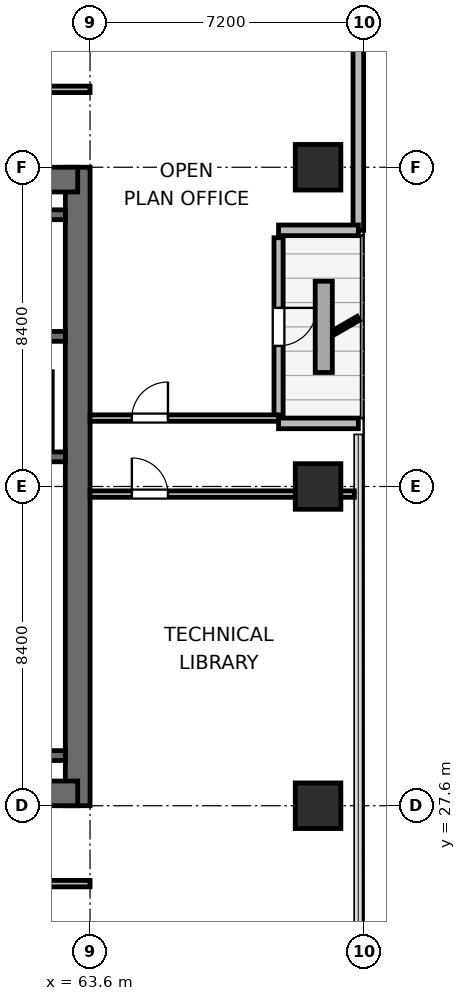
"""IFC4 building model, lengths in metres.
Left out: names, types, materials, properties, quantities, classifications, styles, units other than length and angle.
Written with IfcOpenShell. Run it as: python <this file> out.ifc"""

import sys

from ifc_helpers import new_model, si_unit, direction, frame, frame_2d, origin, origin_2d, place, context, subcontext, project, spatial, rectangle, extrude, element, fill, save


model = new_model("IFC4")
c1 = context("Model", 3, precision=1e-05, world=origin(), true_north=direction((0.0, 1.0)))
c2 = subcontext(c1, "Body", "Model", "MODEL_VIEW")
j1 = project(units=[si_unit("LENGTHUNIT", "METRE"), si_unit("PLANEANGLEUNIT", "RADIAN")], contexts=[c1])
p1 = place(None, origin())
s1 = spatial("IfcSite", under=j1, at=p1, CompositionType="ELEMENT")
p2 = place(p1, origin())
s2 = spatial("IfcBuilding", under=s1, at=p2, CompositionType="ELEMENT")
p3 = place(p2, frame((0.0, 0.0, 181.8)))
s3 = spatial("IfcBuildingStorey", under=s2, at=p3, CompositionType="ELEMENT", Elevation=181.8)
p4 = place(p3, frame((63.275, 27.6, 0.0), z_axis=(0.0, 0.0, 1.0), x_axis=(0.0, 1.0, 0.0)))
e1 = element("IfcWall", 1, at=p4, inside=s3, PredefinedType="SHEAR", context=c2, shape_type="SweptSolid", body=[
    extrude(rectangle(XDim=16.8, YDim=0.65, at=frame_2d((8.4, 0.0))), origin(), (0.0, 0.0, 1.0), 4.5),
])
p5 = place(p3, frame((53.925, 27.925, 0.0), z_axis=(0.0, 0.0, 1.0), x_axis=(1.0, 0.0, 0.0)))
e2 = element("IfcWall", 2, at=p5, inside=s3, PredefinedType="SHEAR", context=c2, shape_type="SweptSolid", body=[
    extrude(rectangle(XDim=9.35, YDim=0.65, at=frame_2d((4.675, 0.0))), origin(), (0.0, 0.0, 1.0), 4.5),
])
p6 = place(p5, frame((3.975, 0.0, 0.0)))
e3 = element("IfcOpeningElement", 3, at=p6, cuts=e2, PredefinedType="OPENING", context=c2, shape_type="SweptSolid", body=[
    extrude(rectangle(XDim=1.05, YDim=2.04, at=frame_2d((0.525, 1.02))), frame((0.0, 0.335, 0.0), z_axis=(0.0, -1.0, 0.0), x_axis=(1.0, 0.0, 0.0)), (0.0, 0.0, 1.0), 0.67),
])
p7 = place(p3, frame((53.925, 44.075, 0.0), z_axis=(0.0, 0.0, 1.0), x_axis=(1.0, 0.0, 0.0)))
e4 = element("IfcWall", 4, at=p7, inside=s3, PredefinedType="SHEAR", context=c2, shape_type="SweptSolid", body=[
    extrude(rectangle(XDim=9.35, YDim=0.65, at=frame_2d((4.675, 0.0))), origin(), (0.0, 0.0, 1.0), 4.5),
])
for number, where, z_axis, x_axis in (
    (5, (58.89, 28.92, 0.0), (0.0, 0.0, 1.0), (1.0, 0.0, 0.0)),
    (6, (58.89, 36.78, 0.0), (0.0, 0.0, 1.0), (1.0, 0.0, 0.0)),
):
    element("IfcWall", number, at=place(p3, frame(where, z_axis=z_axis, x_axis=x_axis)), inside=s3, PredefinedType="SHEAR", context=c2, shape_type="SweptSolid", body=[
        extrude(rectangle(XDim=4.06, YDim=0.26, at=frame_2d((2.03, 0.0))), origin(), (0.0, 0.0, 1.0), 4.5),
    ])
p8 = place(p3, frame((54.25, 39.95, 0.0), z_axis=(0.0, 0.0, 1.0), x_axis=(1.0, 0.0, 0.0)))
e7 = element("IfcWall", 7, at=p8, inside=s3, PredefinedType="SHEAR", context=c2, shape_type="SweptSolid", body=[
    extrude(rectangle(XDim=8.7, YDim=0.26, at=frame_2d((4.35, 0.0))), origin(), (0.0, 0.0, 1.0), 4.5),
])
p9 = place(p8, frame((0.95, 0.0, 0.0)))
e8 = element("IfcOpeningElement", 8, at=p9, cuts=e7, PredefinedType="OPENING", context=c2, shape_type="SweptSolid", body=[
    extrude(rectangle(XDim=1.0, YDim=2.04, at=frame_2d((0.5, 1.02))), frame((0.0, 0.14, 0.0), z_axis=(0.0, -1.0, 0.0), x_axis=(1.0, 0.0, 0.0)), (0.0, 0.0, 1.0), 0.28),
])
p10 = place(p3, frame((54.25, 43.15, 0.0), z_axis=(0.0, 0.0, 1.0), x_axis=(1.0, 0.0, 0.0)))
e9 = element("IfcWall", 9, at=p10, inside=s3, PredefinedType="SHEAR", context=c2, shape_type="SweptSolid", body=[
    extrude(rectangle(XDim=8.7, YDim=0.26, at=frame_2d((4.35, 0.0))), origin(), (0.0, 0.0, 1.0), 4.5),
])
for number, where, z_axis, x_axis in (
    (10, (69.6, 27.6, 0.0), (0.0, 0.0, 1.0), (1.0, 0.0, 0.0)),
    (11, (69.6, 36.0, 0.0), (0.0, 0.0, 1.0), (1.0, 0.0, 0.0)),
    (12, (69.6, 44.4, 0.0), (0.0, 0.0, 1.0), (1.0, 0.0, 0.0)),
):
    element("IfcColumn", number, at=place(p3, frame(where, z_axis=z_axis, x_axis=x_axis)), inside=s3, PredefinedType="COLUMN", context=c2, shape_type="SweptSolid", body=[
        extrude(rectangle(XDim=1.2, YDim=1.2, at=origin_2d()), origin(), (0.0, 0.0, 1.0), 4.5),
    ])
p11 = place(p3, frame((70.66, 56.982, 0.0), z_axis=(0.0, 0.0, 1.0), x_axis=(0.0, -1.0, 0.0)))
e13 = element("IfcWall", 13, at=p11, inside=s3, PredefinedType="SOLIDWALL", context=c2, shape_type="SweptSolid", body=[
    extrude(rectangle(XDim=14.242, YDim=0.28, at=frame_2d((7.121, 0.0))), origin(), (0.0, 0.0, 1.0), 4.28),
])
p12 = place(p3, frame((70.66, 42.74, 0.0), z_axis=(0.0, 0.0, 1.0), x_axis=(-1.0, 0.0, 0.0)))
e14 = element("IfcWall", 14, at=p12, inside=s3, PredefinedType="SOLIDWALL", context=c2, shape_type="SweptSolid", body=[
    extrude(rectangle(XDim=2.1, YDim=0.28, at=frame_2d((1.05, 0.0))), origin(), (0.0, 0.0, 1.0), 3.716),
])
p13 = place(p3, frame((68.56, 42.545, 0.0), z_axis=(0.0, 0.0, 1.0), x_axis=(0.0, -1.0, 0.0)))
e15 = element("IfcWall", 15, at=p13, inside=s3, PredefinedType="SOLIDWALL", context=c2, shape_type="SweptSolid", body=[
    extrude(rectangle(XDim=4.69, YDim=0.24, at=frame_2d((2.345, 0.0))), origin(), (0.0, 0.0, 1.0), 3.848),
])
p14 = place(p13, frame((1.845, 0.0, 0.0)))
e16 = element("IfcOpeningElement", 16, at=p14, cuts=e15, PredefinedType="OPENING", context=c2, shape_type="SweptSolid", body=[
    extrude(rectangle(XDim=1.0, YDim=2.02, at=frame_2d((0.5, 1.01))), frame((0.0, 0.13, 0.0), z_axis=(0.0, -1.0, 0.0), x_axis=(1.0, 0.0, 0.0)), (0.0, 0.0, 1.0), 0.26),
])
p15 = place(p3, frame((68.56, 37.66, 0.0), z_axis=(0.0, 0.0, 1.0), x_axis=(1.0, 0.0, 0.0)))
e17 = element("IfcWall", 17, at=p15, inside=s3, PredefinedType="SOLIDWALL", context=c2, shape_type="SweptSolid", body=[
    extrude(rectangle(XDim=2.1, YDim=0.28, at=frame_2d((1.05, 0.0))), origin(), (0.0, 0.0, 1.0), 3.716),
])
p16 = place(p3, frame((62.5, 36.98, 0.0), z_axis=(0.0, 0.0, 1.0), x_axis=(0.0, 1.0, 0.0)))
e18 = element("IfcWall", 18, at=p16, inside=s3, PredefinedType="PARTITIONING", context=c2, shape_type="SweptSolid", body=[
    extrude(rectangle(XDim=2.04, YDim=0.21, at=frame_2d((1.02, 0.0))), origin(), (0.0, 0.0, 1.0), 4.28),
])
p17 = place(p3, frame((30.35, 25.55, 0.0), z_axis=(0.0, 0.0, 1.0), x_axis=(1.0, 0.0, 0.0)))
e19 = element("IfcWall", 19, at=p17, inside=s3, PredefinedType="PARTITIONING", context=c2, shape_type="SweptSolid", body=[
    extrude(rectangle(XDim=33.25, YDim=0.17, at=frame_2d((16.625, 0.0))), origin(), (0.0, 0.0, 1.0), 4.28),
])
p18 = place(p17, frame((7.84, 0.0, 0.0)))
e20 = element("IfcOpeningElement", 20, at=p18, cuts=e19, PredefinedType="OPENING", context=c2, shape_type="SweptSolid", body=[
    extrude(rectangle(XDim=0.95, YDim=2.04, at=frame_2d((0.475, 1.02))), frame((0.0, 0.095, 0.0), z_axis=(0.0, -1.0, 0.0), x_axis=(1.0, 0.0, 0.0)), (0.0, 0.0, 1.0), 0.19),
])
p19 = place(p17, frame((24.465, 0.0, 0.0)))
e21 = element("IfcOpeningElement", 21, at=p19, cuts=e19, PredefinedType="OPENING", context=c2, shape_type="SweptSolid", body=[
    extrude(rectangle(XDim=0.95, YDim=2.04, at=frame_2d((0.475, 1.02))), frame((0.0, 0.095, 0.0), z_axis=(0.0, -1.0, 0.0), x_axis=(1.0, 0.0, 0.0)), (0.0, 0.0, 1.0), 0.19),
])
p20 = place(p3, frame((30.35, 46.45, 0.0), z_axis=(0.0, 0.0, 1.0), x_axis=(1.0, 0.0, 0.0)))
e22 = element("IfcWall", 22, at=p20, inside=s3, PredefinedType="PARTITIONING", context=c2, shape_type="SweptSolid", body=[
    extrude(rectangle(XDim=33.25, YDim=0.17, at=frame_2d((16.625, 0.0))), origin(), (0.0, 0.0, 1.0), 4.28),
])
p21 = place(p20, frame((3.83, 0.0, 0.0)))
e23 = element("IfcOpeningElement", 23, at=p21, cuts=e22, PredefinedType="OPENING", context=c2, shape_type="SweptSolid", body=[
    extrude(rectangle(XDim=0.95, YDim=2.04, at=frame_2d((0.475, 1.02))), frame((0.0, 0.095, 0.0), z_axis=(0.0, -1.0, 0.0), x_axis=(1.0, 0.0, 0.0)), (0.0, 0.0, 1.0), 0.19),
])
p22 = place(p20, frame((9.495, 0.0, 0.0)))
e24 = element("IfcOpeningElement", 24, at=p22, cuts=e22, PredefinedType="OPENING", context=c2, shape_type="SweptSolid", body=[
    extrude(rectangle(XDim=0.95, YDim=2.04, at=frame_2d((0.475, 1.02))), frame((0.0, 0.095, 0.0), z_axis=(0.0, -1.0, 0.0), x_axis=(1.0, 0.0, 0.0)), (0.0, 0.0, 1.0), 0.19),
])
p23 = place(p20, frame((14.915, 0.0, 0.0)))
e25 = element("IfcOpeningElement", 25, at=p23, cuts=e22, PredefinedType="OPENING", context=c2, shape_type="SweptSolid", body=[
    extrude(rectangle(XDim=0.95, YDim=2.04, at=frame_2d((0.475, 1.02))), frame((0.0, 0.095, 0.0), z_axis=(0.0, -1.0, 0.0), x_axis=(1.0, 0.0, 0.0)), (0.0, 0.0, 1.0), 0.19),
])
p24 = place(p20, frame((21.945, 0.0, 0.0)))
e26 = element("IfcOpeningElement", 26, at=p24, cuts=e22, PredefinedType="OPENING", context=c2, shape_type="SweptSolid", body=[
    extrude(rectangle(XDim=0.95, YDim=2.04, at=frame_2d((0.475, 1.02))), frame((0.0, 0.095, 0.0), z_axis=(0.0, -1.0, 0.0), x_axis=(1.0, 0.0, 0.0)), (0.0, 0.0, 1.0), 0.19),
])
p25 = place(p20, frame((28.845, 0.0, 0.0)))
e27 = element("IfcOpeningElement", 27, at=p25, cuts=e22, PredefinedType="OPENING", context=c2, shape_type="SweptSolid", body=[
    extrude(rectangle(XDim=0.95, YDim=2.04, at=frame_2d((0.475, 1.02))), frame((0.0, 0.095, 0.0), z_axis=(0.0, -1.0, 0.0), x_axis=(1.0, 0.0, 0.0)), (0.0, 0.0, 1.0), 0.19),
])
p26 = place(p3, frame((63.6, 35.8, 0.0), z_axis=(0.0, 0.0, 1.0), x_axis=(1.0, 0.0, 0.0)))
e28 = element("IfcWall", 28, at=p26, inside=s3, PredefinedType="PARTITIONING", context=c2, shape_type="SweptSolid", body=[
    extrude(rectangle(XDim=6.955, YDim=0.17, at=frame_2d((3.478, 0.0))), origin(), (0.0, 0.0, 1.0), 3.643),
])
p27 = place(p26, frame((1.1, 0.0, 0.0)))
e29 = element("IfcOpeningElement", 29, at=p27, cuts=e28, PredefinedType="OPENING", context=c2, shape_type="SweptSolid", body=[
    extrude(rectangle(XDim=0.95, YDim=2.04, at=frame_2d((0.475, 1.02))), frame((0.0, 0.095, 0.0), z_axis=(0.0, -1.0, 0.0), x_axis=(1.0, 0.0, 0.0)), (0.0, 0.0, 1.0), 0.19),
])
p28 = place(p3, frame((63.6, 37.8, 0.0), z_axis=(0.0, 0.0, 1.0), x_axis=(1.0, 0.0, 0.0)))
e30 = element("IfcWall", 30, at=p28, inside=s3, PredefinedType="PARTITIONING", context=c2, shape_type="SweptSolid", body=[
    extrude(rectangle(XDim=4.96, YDim=0.17, at=frame_2d((2.48, 0.0))), origin(), (0.0, 0.0, 1.0), 4.28),
])
p29 = place(p28, frame((1.1, 0.0, 0.0)))
e31 = element("IfcOpeningElement", 31, at=p29, cuts=e30, PredefinedType="OPENING", context=c2, shape_type="SweptSolid", body=[
    extrude(rectangle(XDim=0.95, YDim=2.04, at=frame_2d((0.475, 1.02))), frame((0.0, 0.095, 0.0), z_axis=(0.0, -1.0, 0.0), x_axis=(1.0, 0.0, 0.0)), (0.0, 0.0, 1.0), 0.19),
])
p30 = place(p14, origin())
e32 = element("IfcDoor", 32, at=p30, inside=s3, OperationType="SINGLE_SWING_LEFT", PredefinedType="DOOR", context=c2, shape_type="SweptSolid", body=[
    extrude(rectangle(XDim=1.0, YDim=2.02, at=frame_2d((0.5, 1.01))), frame((0.0, 0.025, 0.0), z_axis=(0.0, -1.0, 0.0), x_axis=(1.0, 0.0, 0.0)), (0.0, 0.0, 1.0), 0.05),
])
fill(e16, e32)
p31 = place(p27, origin())
e33 = element("IfcDoor", 33, at=p31, inside=s3, OperationType="SINGLE_SWING_LEFT", PredefinedType="DOOR", context=c2, shape_type="SweptSolid", body=[
    extrude(rectangle(XDim=0.95, YDim=2.04, at=frame_2d((0.475, 1.02))), frame((0.0, 0.025, 0.0), z_axis=(0.0, -1.0, 0.0), x_axis=(1.0, 0.0, 0.0)), (0.0, 0.0, 1.0), 0.05),
])
fill(e29, e33)
p32 = place(p29, origin())
e34 = element("IfcDoor", 34, at=p32, inside=s3, OperationType="SINGLE_SWING_RIGHT", PredefinedType="DOOR", context=c2, shape_type="SweptSolid", body=[
    extrude(rectangle(XDim=0.95, YDim=2.04, at=frame_2d((0.475, 1.02))), frame((0.0, 0.025, 0.0), z_axis=(0.0, -1.0, 0.0), x_axis=(1.0, 0.0, 0.0)), (0.0, 0.0, 1.0), 0.05),
])
fill(e31, e34)
save(model, sys.argv[1])
